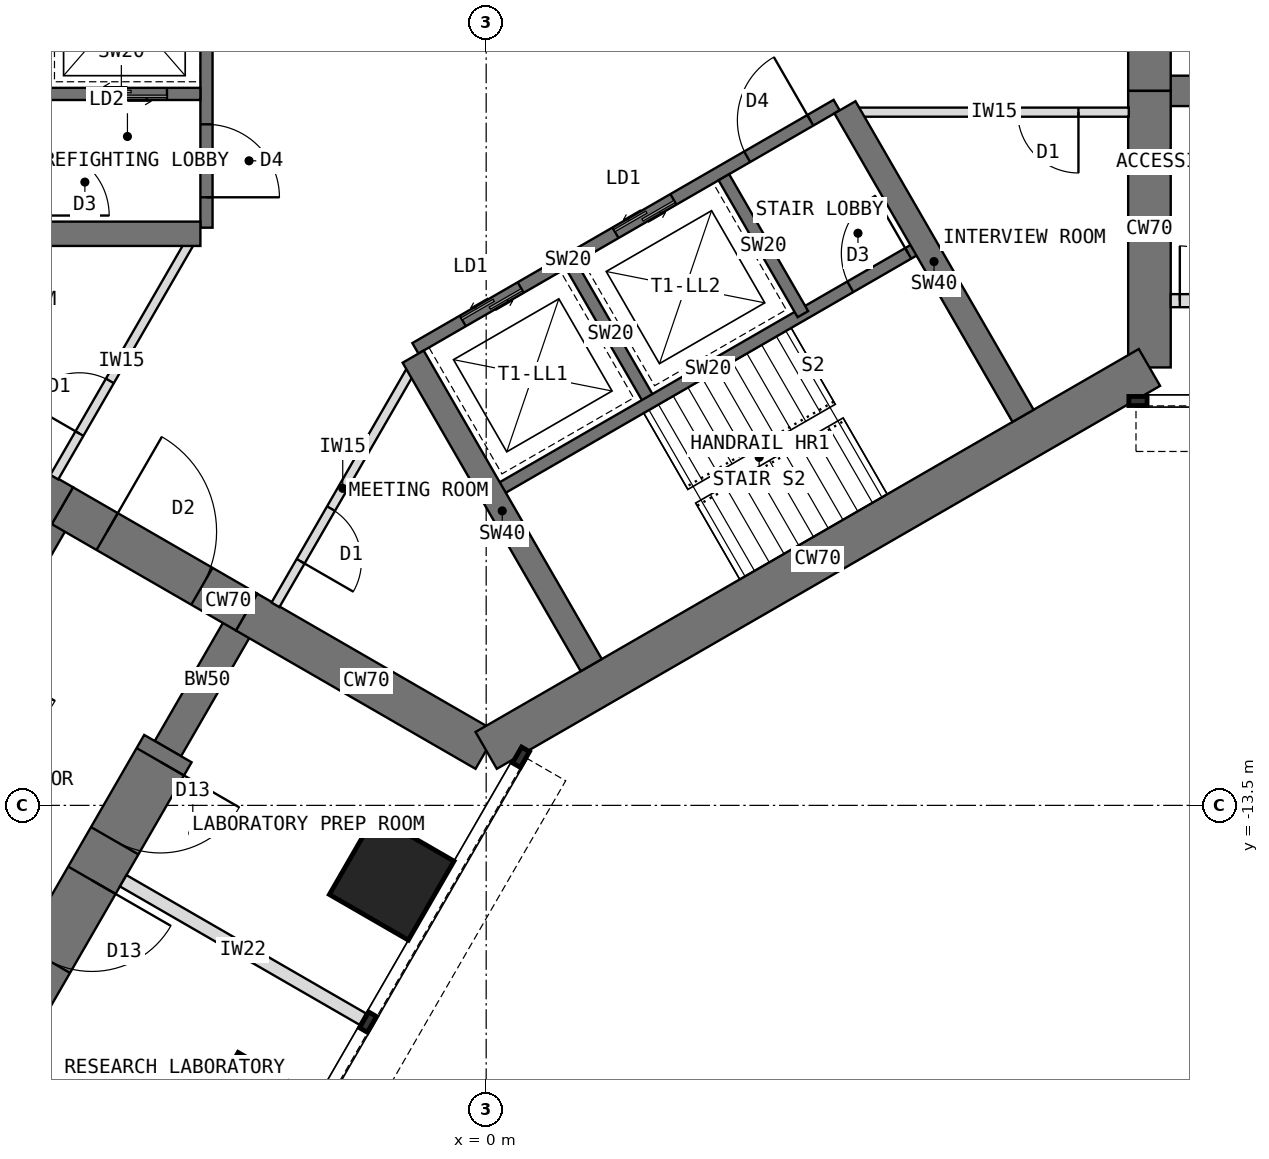
"""IFC4 building model, lengths in metres.
Left out: names, types, materials, properties, quantities, classifications, styles, units other than length and angle.
Written with IfcOpenShell. Run it as: python <this file> out.ifc"""

import sys

from ifc_helpers import new_model, si_unit, direction, frame, frame_2d, origin, origin_2d, place, context, subcontext, project, spatial, rectangle, extrude, element, fill, save


model = new_model("IFC4")
c1 = context("Model", 3, precision=1e-05, world=origin(), true_north=direction((0.0, 1.0)))
c2 = subcontext(c1, "Body", "Model", "MODEL_VIEW")
j1 = project(units=[si_unit("LENGTHUNIT", "METRE"), si_unit("PLANEANGLEUNIT", "RADIAN")], contexts=[c1])
p1 = place(None, origin())
s1 = spatial("IfcSite", under=j1, at=p1, CompositionType="ELEMENT")
p2 = place(p1, origin())
s2 = spatial("IfcBuilding", under=s1, at=p2, CompositionType="ELEMENT")
p3 = place(p2, frame((0.0, 0.0, 36.5)))
s3 = spatial("IfcBuildingStorey", under=s2, at=p3, CompositionType="ELEMENT", Elevation=36.5)
p4 = place(p3, frame((10.908, -6.298, 0.0), z_axis=(0.0, 0.0, 1.0), x_axis=(0.0, 1.0, 0.0)))
e1 = element("IfcWall", 1, at=p4, inside=s3, PredefinedType="SHEAR", context=c2, shape_type="SweptSolid", body=[
    extrude(rectangle(XDim=4.548, YDim=0.7, at=frame_2d((2.274, 0.0))), origin(), (0.0, 0.0, 1.0), 4.0),
])
p5 = place(p3, frame((10.908, -1.75, 0.0), z_axis=(0.0, 0.0, 1.0), x_axis=(0.0, 1.0, 0.0)))
e2 = element("IfcWall", 2, at=p5, inside=s3, PredefinedType="SHEAR", context=c2, shape_type="SweptSolid", body=[
    extrude(rectangle(XDim=3.5, YDim=0.7, at=frame_2d((1.75, 0.0))), origin(), (0.0, 0.0, 1.0), 4.0),
])
p6 = place(p5, frame((0.85, 0.0, 0.0)))
e3 = element("IfcOpeningElement", 3, at=p6, cuts=e2, PredefinedType="OPENING", context=c2, shape_type="SweptSolid", body=[
    extrude(rectangle(XDim=1.8, YDim=2.1, at=frame_2d((0.9, 1.05))), frame((0.0, 0.36, 0.0), z_axis=(0.0, -1.0, 0.0), x_axis=(1.0, 0.0, 0.0)), (0.0, 0.0, 1.0), 0.72),
])
p7 = place(p3, frame((-10.908, -6.298, 0.0), z_axis=(0.0, 0.0, 1.0), x_axis=(0.866034513004, -0.499984222037, 0.0)))
e4 = element("IfcWall", 4, at=p7, inside=s3, PredefinedType="SHEAR", context=c2, shape_type="SweptSolid", body=[
    extrude(rectangle(XDim=4.548, YDim=0.7, at=frame_2d((2.274, 0.0))), origin(), (0.0, 0.0, 1.0), 4.0),
])
p8 = place(p3, frame((-6.97, -8.572, 0.0), z_axis=(0.0, 0.0, 1.0), x_axis=(0.866019471182, -0.500010275428, 0.0)))
e5 = element("IfcWall", 5, at=p8, inside=s3, PredefinedType="SHEAR", context=c2, shape_type="SweptSolid", body=[
    extrude(rectangle(XDim=3.5, YDim=0.7, at=frame_2d((1.75, 0.0))), origin(), (0.0, 0.0, 1.0), 4.0),
])
p9 = place(p8, frame((0.85, 0.0, 0.0)))
e6 = element("IfcOpeningElement", 6, at=p9, cuts=e5, PredefinedType="OPENING", context=c2, shape_type="SweptSolid", body=[
    extrude(rectangle(XDim=1.8, YDim=2.1, at=frame_2d((0.9, 1.05))), frame((0.0, 0.36, 0.0), z_axis=(0.0, -1.0, 0.0), x_axis=(1.0, 0.0, 0.0)), (0.0, 0.0, 1.0), 0.72),
])
p10 = place(p3, frame((-3.939, -10.322, 0.0), z_axis=(0.0, 0.0, 1.0), x_axis=(0.866011268655, -0.500024481964, 0.0)))
e7 = element("IfcWall", 7, at=p10, inside=s3, PredefinedType="SHEAR", context=c2, shape_type="SweptSolid", body=[
    extrude(rectangle(XDim=4.548, YDim=0.7, at=frame_2d((2.274, 0.0))), origin(), (0.0, 0.0, 1.0), 4.0),
])
p11 = place(p3, frame((0.0, -12.596, 0.0), z_axis=(0.0, 0.0, 1.0), x_axis=(0.866021940709, 0.500005998175, 0.0)))
e8 = element("IfcWall", 8, at=p11, inside=s3, PredefinedType="SHEAR", context=c2, shape_type="SweptSolid", body=[
    extrude(rectangle(XDim=12.596, YDim=0.7, at=frame_2d((6.298, 0.0))), origin(), (0.0, 0.0, 1.0), 4.0),
])
p12 = place(p3, frame((10.908, -1.75, 0.0), z_axis=(0.0, 0.0, 1.0), x_axis=(1.0, 0.0, 0.0)))
e9 = element("IfcWall", 9, at=p12, inside=s3, PredefinedType="SHEAR", context=c2, shape_type="SweptSolid", body=[
    extrude(rectangle(XDim=2.592, YDim=0.5, at=frame_2d((1.296, 0.0))), origin(), (0.0, 0.0, 1.0), 4.0),
])
p13 = place(p3, frame((-3.939, -10.322, 0.0), z_axis=(0.0, 0.0, 1.0), x_axis=(-0.499918158782, -0.866072649678, 0.0)))
e10 = element("IfcWall", 10, at=p13, inside=s3, PredefinedType="SHEAR", context=c2, shape_type="SweptSolid", body=[
    extrude(rectangle(XDim=2.592, YDim=0.5, at=frame_2d((1.296, 0.0))), origin(), (0.0, 0.0, 1.0), 4.0),
])
p14 = place(p3, frame((-5.234, -12.566, 0.0), z_axis=(0.0, 0.0, 1.0), x_axis=(-0.499997557548, -0.86602681393, 0.0)))
e11 = element("IfcWall", 11, at=p14, inside=s3, PredefinedType="SHEAR", context=c2, shape_type="SweptSolid", body=[
    extrude(rectangle(XDim=9.5, YDim=0.9, at=frame_2d((4.75, 0.0))), origin(), (0.0, 0.0, 1.0), 4.0),
])
p15 = place(p14, frame((0.25, 0.0, 0.0)))
e12 = element("IfcOpeningElement", 12, at=p15, cuts=e11, PredefinedType="OPENING", context=c2, shape_type="SweptSolid", body=[
    extrude(rectangle(XDim=1.5, YDim=2.1, at=frame_2d((0.75, 1.05))), frame((0.0, 0.46, 0.0), z_axis=(0.0, -1.0, 0.0), x_axis=(1.0, 0.0, 0.0)), (0.0, 0.0, 1.0), 0.92),
])
p16 = place(p14, frame((2.5, 0.0, 0.0)))
e13 = element("IfcOpeningElement", 13, at=p16, cuts=e11, PredefinedType="OPENING", context=c2, shape_type="SweptSolid", body=[
    extrude(rectangle(XDim=1.5, YDim=2.1, at=frame_2d((0.75, 1.05))), frame((0.0, 0.46, 0.0), z_axis=(0.0, -1.0, 0.0), x_axis=(1.0, 0.0, 0.0)), (0.0, 0.0, 1.0), 0.92),
])
p17 = place(p3, frame((-6.97, -8.572, 0.0), z_axis=(0.0, 0.0, 1.0), x_axis=(-0.499988811324, -0.866031863473, 0.0)))
e14 = element("IfcWall", 14, at=p17, inside=s3, PredefinedType="SHEAR", context=c2, shape_type="SweptSolid", body=[
    extrude(rectangle(XDim=2.592, YDim=0.5, at=frame_2d((1.296, 0.0))), origin(), (0.0, 0.0, 1.0), 4.0),
])
for number, where, z_axis, x_axis in (
    (15, (-1.554, -14.691, 0.0), (0.0, 0.0, 1.0), (0.5, 0.866, 0.0)),
    (16, (-3.804, -18.588, 0.0), (0.0, 0.0, 1.0), (0.5, 0.866, 0.0)),
):
    element("IfcColumn", number, at=place(p3, frame(where, z_axis=z_axis, x_axis=x_axis)), inside=s3, PredefinedType="COLUMN", context=c2, shape_type="SweptSolid", body=[
        extrude(rectangle(XDim=1.5, YDim=1.5, at=origin_2d()), origin(), (0.0, 0.0, 1.0), 4.0),
    ])
p18 = place(p3, frame((-4.6, 4.0, 0.0), z_axis=(0.0, 0.0, 1.0), x_axis=(0.0, -1.0, 0.0)))
e17 = element("IfcWall", 17, at=p18, inside=s3, PredefinedType="SHEAR", context=c2, shape_type="SweptSolid", body=[
    extrude(rectangle(XDim=8.0, YDim=0.2, at=frame_2d((4.0, 0.0))), origin(), (0.0, 0.0, 1.0), 4.0),
])
p19 = place(p18, frame((6.3, 0.0, 0.0)))
e18 = element("IfcOpeningElement", 18, at=p19, cuts=e17, PredefinedType="OPENING", context=c2, shape_type="SweptSolid", body=[
    extrude(rectangle(XDim=1.2, YDim=2.1, at=frame_2d((0.6, 1.05))), frame((0.0, 0.11, 0.0), z_axis=(0.0, -1.0, 0.0), x_axis=(1.0, 0.0, 0.0)), (0.0, 0.0, 1.0), 0.22),
])
p20 = place(p18, frame((0.9, 0.0, 0.0)))
e19 = element("IfcOpeningElement", 19, at=p20, cuts=e17, PredefinedType="OPENING", context=c2, shape_type="SweptSolid", body=[
    extrude(rectangle(XDim=1.1, YDim=2.2, at=frame_2d((0.55, 1.1))), frame((0.0, 0.11, 0.0), z_axis=(0.0, -1.0, 0.0), x_axis=(1.0, 0.0, 0.0)), (0.0, 0.0, 1.0), 0.22),
])
p21 = place(p3, frame((-4.7, -1.8, 0.0), z_axis=(0.0, 0.0, 1.0), x_axis=(-1.0, 0.0, 0.0)))
e20 = element("IfcWall", 20, at=p21, inside=s3, PredefinedType="SHEAR", context=c2, shape_type="SweptSolid", body=[
    extrude(rectangle(XDim=2.6, YDim=0.2, at=frame_2d((1.3, 0.0))), origin(), (0.0, 0.0, 1.0), 4.0),
])
p22 = place(p21, frame((0.55, 0.0, 0.0)))
e21 = element("IfcOpeningElement", 21, at=p22, cuts=e20, PredefinedType="OPENING", context=c2, shape_type="SweptSolid", body=[
    extrude(rectangle(XDim=1.3, YDim=2.2, at=frame_2d((0.65, 1.1))), frame((0.0, 0.11, 0.0), z_axis=(0.0, -1.0, 0.0), x_axis=(1.0, 0.0, 0.0)), (0.0, 0.0, 1.0), 0.22),
])
p23 = place(p3, frame((-4.7, -4.1, 0.0), z_axis=(0.0, 0.0, 1.0), x_axis=(-1.0, 0.0, 0.0)))
e22 = element("IfcWall", 22, at=p23, inside=s3, PredefinedType="SHEAR", context=c2, shape_type="SweptSolid", body=[
    extrude(rectangle(XDim=5.858, YDim=0.4, at=frame_2d((2.929, 0.0))), origin(), (0.0, 0.0, 1.0), 4.0),
])
p24 = place(p3, frame((-1.164, -5.984, 0.0), z_axis=(0.0, 0.0, 1.0), x_axis=(0.866026010844, 0.49999894854, 0.0)))
e23 = element("IfcWall", 23, at=p24, inside=s3, PredefinedType="SHEAR", context=c2, shape_type="SweptSolid", body=[
    extrude(rectangle(XDim=8.0, YDim=0.2, at=frame_2d((4.0, 0.0))), origin(), (0.0, 0.0, 1.0), 4.0),
])
p25 = place(p24, frame((6.3, 0.0, 0.0)))
e24 = element("IfcOpeningElement", 24, at=p25, cuts=e23, PredefinedType="OPENING", context=c2, shape_type="SweptSolid", body=[
    extrude(rectangle(XDim=1.2, YDim=2.1, at=frame_2d((0.6, 1.05))), frame((0.0, 0.11, 0.0), z_axis=(0.0, -1.0, 0.0), x_axis=(1.0, 0.0, 0.0)), (0.0, 0.0, 1.0), 0.22),
])
p26 = place(p24, frame((0.9, 0.0, 0.0)))
e25 = element("IfcOpeningElement", 25, at=p26, cuts=e23, PredefinedType="OPENING", context=c2, shape_type="SweptSolid", body=[
    extrude(rectangle(XDim=1.1, YDim=2.2, at=frame_2d((0.55, 1.1))), frame((0.0, 0.11, 0.0), z_axis=(0.0, -1.0, 0.0), x_axis=(1.0, 0.0, 0.0)), (0.0, 0.0, 1.0), 0.22),
])
p27 = place(p24, frame((3.8, 0.0, 0.0)))
e26 = element("IfcOpeningElement", 26, at=p27, cuts=e23, PredefinedType="OPENING", context=c2, shape_type="SweptSolid", body=[
    extrude(rectangle(XDim=1.1, YDim=2.2, at=frame_2d((0.55, 1.1))), frame((0.0, 0.11, 0.0), z_axis=(0.0, -1.0, 0.0), x_axis=(1.0, 0.0, 0.0)), (0.0, 0.0, 1.0), 0.22),
])
p28 = place(p3, frame((1.397, -4.62, 0.0), z_axis=(0.0, 0.0, 1.0), x_axis=(0.499936506574, -0.866062058628, 0.0)))
e27 = element("IfcWall", 27, at=p28, inside=s3, PredefinedType="SHEAR", context=c2, shape_type="SweptSolid", body=[
    extrude(rectangle(XDim=2.6, YDim=0.2, at=frame_2d((1.3, 0.0))), origin(), (0.0, 0.0, 1.0), 4.0),
])
p29 = place(p3, frame((3.909, -3.17, 0.0), z_axis=(0.0, 0.0, 1.0), x_axis=(0.49997716683, -0.86603858612, 0.0)))
e28 = element("IfcWall", 28, at=p29, inside=s3, PredefinedType="SHEAR", context=c2, shape_type="SweptSolid", body=[
    extrude(rectangle(XDim=2.6, YDim=0.2, at=frame_2d((1.3, 0.0))), origin(), (0.0, 0.0, 1.0), 4.0),
])
p30 = place(p3, frame((0.186, -8.322, 0.0), z_axis=(0.0, 0.0, 1.0), x_axis=(0.866026010844, 0.49999894854, 0.0)))
e29 = element("IfcWall", 29, at=p30, inside=s3, PredefinedType="SHEAR", context=c2, shape_type="SweptSolid", body=[
    extrude(rectangle(XDim=8.0, YDim=0.2, at=frame_2d((4.0, 0.0))), origin(), (0.0, 0.0, 1.0), 4.0),
])
p31 = place(p30, frame((6.7, 0.0, 0.0)))
e30 = element("IfcOpeningElement", 30, at=p31, cuts=e29, PredefinedType="OPENING", context=c2, shape_type="SweptSolid", body=[
    extrude(rectangle(XDim=1.1, YDim=2.1, at=frame_2d((0.55, 1.05))), frame((0.0, 0.11, 0.0), z_axis=(0.0, -1.0, 0.0), x_axis=(1.0, 0.0, 0.0)), (0.0, 0.0, 1.0), 0.22),
])
for number, where, z_axis, x_axis in (
    (31, (5.901, -2.02, 0.0), (0.0, 0.0, 1.0), (0.5, -0.866, 0.0)),
    (32, (-1.201, -6.12, 0.0), (0.0, 0.0, 1.0), (0.5, -0.866, 0.0)),
):
    element("IfcWall", number, at=place(p3, frame(where, z_axis=z_axis, x_axis=x_axis)), inside=s3, PredefinedType="SHEAR", context=c2, shape_type="SweptSolid", body=[
        extrude(rectangle(XDim=5.858, YDim=0.4, at=frame_2d((2.929, 0.0))), origin(), (0.0, 0.0, 1.0), 4.0),
    ])
p32 = place(p3, frame((11.258, -5.2, 0.0), z_axis=(0.0, 0.0, 1.0), x_axis=(1.0, 0.0, 0.0)))
e33 = element("IfcWall", 33, at=p32, inside=s3, PredefinedType="PARTITIONING", context=c2, shape_type="SweptSolid", body=[
    extrude(rectangle(XDim=2.4, YDim=0.215, at=frame_2d((1.2, 0.0))), origin(), (0.0, 0.0, 1.0), 3.8),
])
p33 = place(p32, frame((0.15, 0.0, 0.0)))
e34 = element("IfcOpeningElement", 34, at=p33, cuts=e33, PredefinedType="OPENING", context=c2, shape_type="SweptSolid", body=[
    extrude(rectangle(XDim=0.9, YDim=2.1, at=frame_2d((0.45, 1.05))), frame((0.0, 0.117, 0.0), z_axis=(0.0, -1.0, 0.0), x_axis=(1.0, 0.0, 0.0)), (0.0, 0.0, 1.0), 0.235),
])
p34 = place(p3, frame((-5.97, -14.74, 0.0), z_axis=(0.0, 0.0, 1.0), x_axis=(0.866035472144, -0.499982560684, 0.0)))
e35 = element("IfcWall", 35, at=p34, inside=s3, PredefinedType="PARTITIONING", context=c2, shape_type="SweptSolid", body=[
    extrude(rectangle(XDim=4.55, YDim=0.215, at=frame_2d((2.275, 0.0))), origin(), (0.0, 0.0, 1.0), 3.8),
])
p35 = place(p3, frame((-1.253, -6.37, 0.0), z_axis=(0.0, 0.0, 1.0), x_axis=(-0.500007369519, -0.866021148949, 0.0)))
e36 = element("IfcWall", 36, at=p35, inside=s3, PredefinedType="PARTITIONING", context=c2, shape_type="SweptSolid", body=[
    extrude(rectangle(XDim=4.426, YDim=0.15, at=frame_2d((2.213, 0.0))), origin(), (0.0, 0.0, 1.0), 3.8),
])
p36 = place(p35, frame((2.598, 0.0, 0.0)))
e37 = element("IfcOpeningElement", 37, at=p36, cuts=e36, PredefinedType="OPENING", context=c2, shape_type="SweptSolid", body=[
    extrude(rectangle(XDim=1.0, YDim=2.1, at=frame_2d((0.5, 1.05))), frame((0.0, 0.085, 0.0), z_axis=(0.0, -1.0, 0.0), x_axis=(1.0, 0.0, 0.0)), (0.0, 0.0, 1.0), 0.17),
])
p37 = place(p3, frame((-7.103, -8.103, 0.0), z_axis=(0.0, 0.0, 1.0), x_axis=(0.500007369519, 0.866021148949, 0.0)))
e38 = element("IfcWall", 38, at=p37, inside=s3, PredefinedType="PARTITIONING", context=c2, shape_type="SweptSolid", body=[
    extrude(rectangle(XDim=4.426, YDim=0.15, at=frame_2d((2.213, 0.0))), origin(), (0.0, 0.0, 1.0), 3.8),
])
p38 = place(p37, frame((0.828, 0.0, 0.0)))
e39 = element("IfcOpeningElement", 39, at=p38, cuts=e38, PredefinedType="OPENING", context=c2, shape_type="SweptSolid", body=[
    extrude(rectangle(XDim=1.0, YDim=2.1, at=frame_2d((0.5, 1.05))), frame((0.0, 0.085, 0.0), z_axis=(0.0, -1.0, 0.0), x_axis=(1.0, 0.0, 0.0)), (0.0, 0.0, 1.0), 0.17),
])
p39 = place(p3, frame((10.568, -2.1, 0.0), z_axis=(0.0, 0.0, 1.0), x_axis=(-1.0, 0.0, 0.0)))
e40 = element("IfcWall", 40, at=p39, inside=s3, PredefinedType="PARTITIONING", context=c2, shape_type="SweptSolid", body=[
    extrude(rectangle(XDim=4.426, YDim=0.15, at=frame_2d((2.213, 0.0))), origin(), (0.0, 0.0, 1.0), 3.8),
])
p40 = place(p39, frame((0.828, 0.0, 0.0)))
e41 = element("IfcOpeningElement", 41, at=p40, cuts=e40, PredefinedType="OPENING", context=c2, shape_type="SweptSolid", body=[
    extrude(rectangle(XDim=1.0, YDim=2.1, at=frame_2d((0.5, 1.05))), frame((0.0, 0.085, 0.0), z_axis=(0.0, -1.0, 0.0), x_axis=(1.0, 0.0, 0.0)), (0.0, 0.0, 1.0), 0.17),
])
p41 = place(p19, origin())
e42 = element("IfcDoor", 42, at=p41, inside=s3, OperationType="SINGLE_SWING_RIGHT", PredefinedType="DOOR", context=c2, shape_type="SweptSolid", body=[
    extrude(rectangle(XDim=1.2, YDim=2.1, at=frame_2d((0.6, 1.05))), frame((0.0, 0.025, 0.0), z_axis=(0.0, -1.0, 0.0), x_axis=(1.0, 0.0, 0.0)), (0.0, 0.0, 1.0), 0.05),
])
fill(e18, e42)
p42 = place(p22, origin())
e43 = element("IfcDoor", 43, at=p42, inside=s3, OperationType="DOUBLE_DOOR_SLIDING", PredefinedType="DOOR", context=c2, shape_type="SweptSolid", body=[
    extrude(rectangle(XDim=1.3, YDim=2.2, at=frame_2d((0.65, 1.1))), frame((0.0, 0.025, 0.0), z_axis=(0.0, -1.0, 0.0), x_axis=(1.0, 0.0, 0.0)), (0.0, 0.0, 1.0), 0.05),
])
fill(e21, e43)
p43 = place(p25, origin())
e44 = element("IfcDoor", 44, at=p43, inside=s3, OperationType="SINGLE_SWING_RIGHT", PredefinedType="DOOR", context=c2, shape_type="SweptSolid", body=[
    extrude(rectangle(XDim=1.2, YDim=2.1, at=frame_2d((0.6, 1.05))), frame((0.0, 0.025, 0.0), z_axis=(0.0, -1.0, 0.0), x_axis=(1.0, 0.0, 0.0)), (0.0, 0.0, 1.0), 0.05),
])
fill(e24, e44)
p44 = place(p26, origin())
e45 = element("IfcDoor", 45, at=p44, inside=s3, OperationType="DOUBLE_DOOR_SLIDING", PredefinedType="DOOR", context=c2, shape_type="SweptSolid", body=[
    extrude(rectangle(XDim=1.1, YDim=2.2, at=frame_2d((0.55, 1.1))), frame((0.0, 0.025, 0.0), z_axis=(0.0, -1.0, 0.0), x_axis=(1.0, 0.0, 0.0)), (0.0, 0.0, 1.0), 0.05),
])
fill(e25, e45)
p45 = place(p27, origin())
e46 = element("IfcDoor", 46, at=p45, inside=s3, OperationType="DOUBLE_DOOR_SLIDING", PredefinedType="DOOR", context=c2, shape_type="SweptSolid", body=[
    extrude(rectangle(XDim=1.1, YDim=2.2, at=frame_2d((0.55, 1.1))), frame((0.0, 0.025, 0.0), z_axis=(0.0, -1.0, 0.0), x_axis=(1.0, 0.0, 0.0)), (0.0, 0.0, 1.0), 0.05),
])
fill(e26, e46)
p46 = place(p31, origin())
e47 = element("IfcDoor", 47, at=p46, inside=s3, OperationType="SINGLE_SWING_RIGHT", PredefinedType="DOOR", context=c2, shape_type="SweptSolid", body=[
    extrude(rectangle(XDim=1.1, YDim=2.1, at=frame_2d((0.55, 1.05))), frame((0.0, 0.025, 0.0), z_axis=(0.0, -1.0, 0.0), x_axis=(1.0, 0.0, 0.0)), (0.0, 0.0, 1.0), 0.05),
])
fill(e30, e47)
p47 = place(p9, origin())
e48 = element("IfcDoor", 48, at=p47, inside=s3, OperationType="DOUBLE_DOOR_DOUBLE_SWING", PredefinedType="DOOR", context=c2, shape_type="SweptSolid", body=[
    extrude(rectangle(XDim=1.72, YDim=2.06, at=frame_2d((0.9, 1.03))), frame((0.0, 0.025, 0.0), z_axis=(0.0, -1.0, 0.0), x_axis=(1.0, 0.0, 0.0)), (0.0, 0.0, 1.0), 0.05),
    extrude(rectangle(XDim=0.04, YDim=2.1, at=frame_2d((0.02, 1.05))), frame((0.0, 0.35, 0.0), z_axis=(0.0, -1.0, 0.0), x_axis=(1.0, 0.0, 0.0)), (0.0, 0.0, 1.0), 0.699),
    extrude(rectangle(XDim=0.04, YDim=2.1, at=frame_2d((1.78, 1.05))), frame((0.0, 0.35, 0.0), z_axis=(0.0, -1.0, 0.0), x_axis=(1.0, 0.0, 0.0)), (0.0, 0.0, 1.0), 0.699),
    extrude(rectangle(XDim=1.72, YDim=0.04, at=frame_2d((0.9, 2.08))), frame((0.0, 0.35, 0.0), z_axis=(0.0, -1.0, 0.0), x_axis=(1.0, 0.0, 0.0)), (0.0, 0.0, 1.0), 0.699),
])
fill(e6, e48)
p48 = place(p33, origin())
e49 = element("IfcDoor", 49, at=p48, inside=s3, OperationType="SINGLE_SWING_LEFT", PredefinedType="DOOR", context=c2, shape_type="SweptSolid", body=[
    extrude(rectangle(XDim=0.9, YDim=2.1, at=frame_2d((0.45, 1.05))), frame((0.0, 0.025, 0.0), z_axis=(0.0, -1.0, 0.0), x_axis=(1.0, 0.0, 0.0)), (0.0, 0.0, 1.0), 0.05),
])
fill(e34, e49)
p49 = place(p38, origin())
e50 = element("IfcDoor", 50, at=p49, inside=s3, OperationType="SINGLE_SWING_LEFT", PredefinedType="DOOR", context=c2, shape_type="SweptSolid", body=[
    extrude(rectangle(XDim=1.0, YDim=2.1, at=frame_2d((0.5, 1.05))), frame((0.0, 0.025, 0.0), z_axis=(0.0, -1.0, 0.0), x_axis=(1.0, 0.0, 0.0)), (0.0, 0.0, 1.0), 0.05),
])
fill(e39, e50)
p50 = place(p36, origin())
e51 = element("IfcDoor", 51, at=p50, inside=s3, OperationType="SINGLE_SWING_RIGHT", PredefinedType="DOOR", context=c2, shape_type="SweptSolid", body=[
    extrude(rectangle(XDim=1.0, YDim=2.1, at=frame_2d((0.5, 1.05))), frame((0.0, 0.025, 0.0), z_axis=(0.0, -1.0, 0.0), x_axis=(1.0, 0.0, 0.0)), (0.0, 0.0, 1.0), 0.05),
])
fill(e37, e51)
p51 = place(p40, origin())
e52 = element("IfcDoor", 52, at=p51, inside=s3, OperationType="SINGLE_SWING_LEFT", PredefinedType="DOOR", context=c2, shape_type="SweptSolid", body=[
    extrude(rectangle(XDim=1.0, YDim=2.1, at=frame_2d((0.5, 1.05))), frame((0.0, 0.025, 0.0), z_axis=(0.0, -1.0, 0.0), x_axis=(1.0, 0.0, 0.0)), (0.0, 0.0, 1.0), 0.05),
])
fill(e41, e52)
p52 = place(p15, origin())
e53 = element("IfcDoor", 53, at=p52, inside=s3, OperationType="DOUBLE_DOOR_SINGLE_SWING", PredefinedType="DOOR", context=c2, shape_type="SweptSolid", body=[
    extrude(rectangle(XDim=1.42, YDim=2.06, at=frame_2d((0.75, 1.03))), frame((0.0, 0.025, 0.0), z_axis=(0.0, -1.0, 0.0), x_axis=(1.0, 0.0, 0.0)), (0.0, 0.0, 1.0), 0.05),
    extrude(rectangle(XDim=0.04, YDim=2.1, at=frame_2d((0.02, 1.05))), frame((0.0, 0.45, 0.0), z_axis=(0.0, -1.0, 0.0), x_axis=(1.0, 0.0, 0.0)), (0.0, 0.0, 1.0), 0.899),
    extrude(rectangle(XDim=0.04, YDim=2.1, at=frame_2d((1.48, 1.05))), frame((0.0, 0.45, 0.0), z_axis=(0.0, -1.0, 0.0), x_axis=(1.0, 0.0, 0.0)), (0.0, 0.0, 1.0), 0.899),
    extrude(rectangle(XDim=1.42, YDim=0.04, at=frame_2d((0.75, 2.08))), frame((0.0, 0.45, 0.0), z_axis=(0.0, -1.0, 0.0), x_axis=(1.0, 0.0, 0.0)), (0.0, 0.0, 1.0), 0.899),
])
fill(e12, e53)
p53 = place(p16, origin())
e54 = element("IfcDoor", 54, at=p53, inside=s3, OperationType="DOUBLE_DOOR_SINGLE_SWING", PredefinedType="DOOR", context=c2, shape_type="SweptSolid", body=[
    extrude(rectangle(XDim=1.42, YDim=2.06, at=frame_2d((0.75, 1.03))), frame((0.0, 0.025, 0.0), z_axis=(0.0, -1.0, 0.0), x_axis=(1.0, 0.0, 0.0)), (0.0, 0.0, 1.0), 0.05),
    extrude(rectangle(XDim=0.04, YDim=2.1, at=frame_2d((0.02, 1.05))), frame((0.0, 0.45, 0.0), z_axis=(0.0, -1.0, 0.0), x_axis=(1.0, 0.0, 0.0)), (0.0, 0.0, 1.0), 0.899),
    extrude(rectangle(XDim=0.04, YDim=2.1, at=frame_2d((1.48, 1.05))), frame((0.0, 0.45, 0.0), z_axis=(0.0, -1.0, 0.0), x_axis=(1.0, 0.0, 0.0)), (0.0, 0.0, 1.0), 0.899),
    extrude(rectangle(XDim=1.42, YDim=0.04, at=frame_2d((0.75, 2.08))), frame((0.0, 0.45, 0.0), z_axis=(0.0, -1.0, 0.0), x_axis=(1.0, 0.0, 0.0)), (0.0, 0.0, 1.0), 0.899),
])
fill(e13, e54)
save(model, sys.argv[1])
